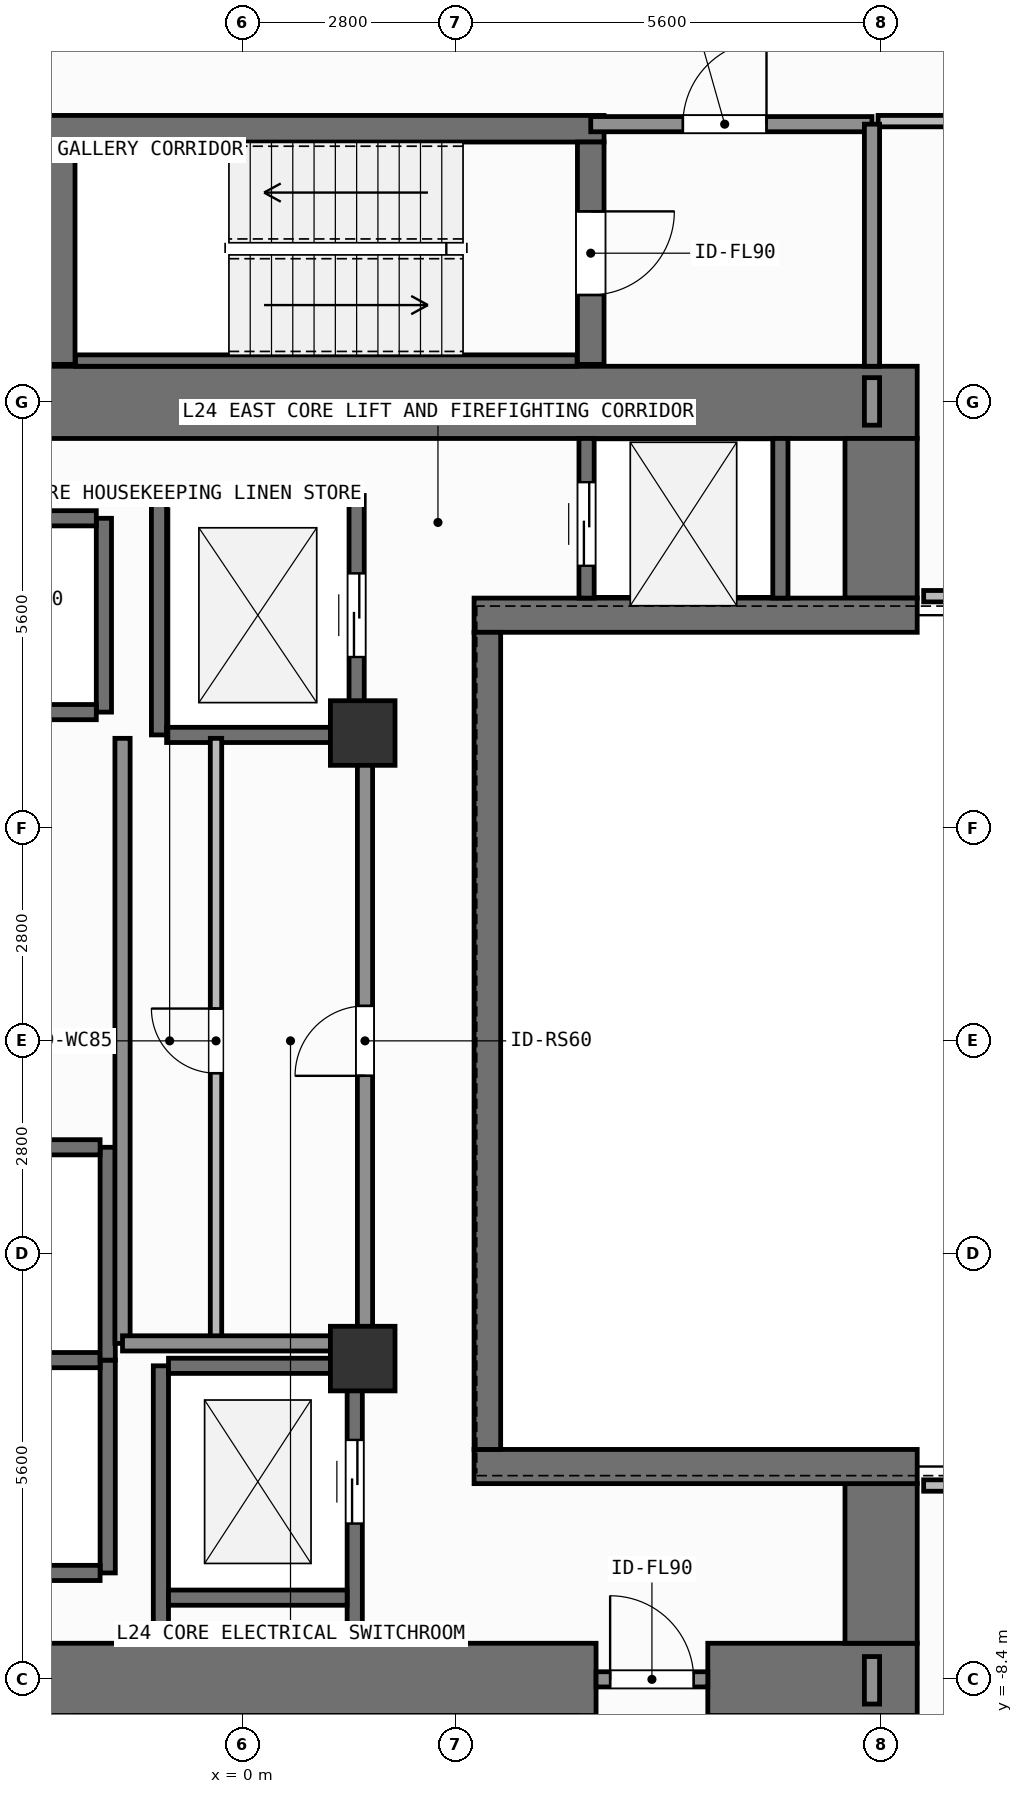
"""IFC4 building model, lengths in metres.
Left out: names, types, materials, properties, quantities, classifications, styles, units other than length and angle.
Written with IfcOpenShell. Run it as: python <this file> out.ifc"""

import sys

from ifc_helpers import new_model, si_unit, direction, frame, frame_2d, origin, origin_2d, place, context, subcontext, project, spatial, rectangle, extrude, element, fill, save


model = new_model("IFC4")
c1 = context("Model", 3, precision=1e-05, world=origin(), true_north=direction((0.0, 1.0)))
c2 = subcontext(c1, "Body", "Model", "MODEL_VIEW")
j1 = project(units=[si_unit("LENGTHUNIT", "METRE"), si_unit("PLANEANGLEUNIT", "RADIAN")], contexts=[c1])
p1 = place(None, origin())
s1 = spatial("IfcSite", under=j1, at=p1, CompositionType="ELEMENT")
p2 = place(p1, origin())
s2 = spatial("IfcBuilding", under=s1, at=p2, CompositionType="ELEMENT")
p3 = place(p2, frame((0.0, 0.0, 96.9)))
s3 = spatial("IfcBuildingStorey", under=s2, at=p3, CompositionType="ELEMENT", Elevation=96.9)
p4 = place(p3, frame((-2.62, -8.4, 0.0), z_axis=(0.0, 0.0, 1.0), x_axis=(1.0, 0.0, 0.0)))
e1 = element("IfcWall", 1, at=p4, inside=s3, PredefinedType="SHEAR", context=c2, shape_type="SweptSolid", body=[
    extrude(rectangle(XDim=7.27, YDim=0.95, at=frame_2d((3.635, 0.0))), origin(), (0.0, 0.0, 1.0), 3.9),
])
p5 = place(p3, frame((6.12, -8.4, 0.0), z_axis=(0.0, 0.0, 1.0), x_axis=(1.0, 0.0, 0.0)))
e2 = element("IfcWall", 2, at=p5, inside=s3, PredefinedType="SHEAR", context=c2, shape_type="SweptSolid", body=[
    extrude(rectangle(XDim=2.755, YDim=0.95, at=frame_2d((1.377, 0.0))), origin(), (0.0, 0.0, 1.0), 3.9),
])
p6 = place(p3, frame((-7.55, 8.4, 0.0), z_axis=(0.0, 0.0, 1.0), x_axis=(1.0, 0.0, 0.0)))
e3 = element("IfcWall", 3, at=p6, inside=s3, PredefinedType="SHEAR", context=c2, shape_type="SweptSolid", body=[
    extrude(rectangle(XDim=16.425, YDim=0.95, at=frame_2d((8.212, 0.0))), origin(), (0.0, 0.0, 1.0), 3.9),
])
for number, where, z_axis, x_axis in (
    (4, (8.4, -7.925, 0.0), (0.0, 0.0, 1.0), (0.0, 1.0, 0.0)),
    (5, (8.4, 5.825, 0.0), (0.0, 0.0, 1.0), (0.0, 1.0, 0.0)),
):
    element("IfcWall", number, at=place(p3, frame(where, z_axis=z_axis, x_axis=x_axis)), inside=s3, PredefinedType="SHEAR", context=c2, shape_type="SweptSolid", body=[
        extrude(rectangle(XDim=2.1, YDim=0.95, at=frame_2d((1.05, 0.0))), origin(), (0.0, 0.0, 1.0), 3.9),
    ])
for number, where, z_axis, x_axis in (
    (6, (3.045, -5.6, 0.0), (0.0, 0.0, 1.0), (1.0, 0.0, 0.0)),
    (7, (3.045, 5.6, 0.0), (0.0, 0.0, 1.0), (1.0, 0.0, 0.0)),
):
    element("IfcWall", number, at=place(p3, frame(where, z_axis=z_axis, x_axis=x_axis)), inside=s3, PredefinedType="SHEAR", context=c2, shape_type="SweptSolid", body=[
        extrude(rectangle(XDim=5.83, YDim=0.45, at=frame_2d((2.915, 0.0))), origin(), (0.0, 0.0, 1.0), 3.9),
    ])
p7 = place(p3, frame((3.22, -5.375, 0.0), z_axis=(0.0, 0.0, 1.0), x_axis=(0.0, 1.0, 0.0)))
e8 = element("IfcWall", 8, at=p7, inside=s3, PredefinedType="SHEAR", context=c2, shape_type="SweptSolid", body=[
    extrude(rectangle(XDim=10.75, YDim=0.35, at=frame_2d((5.375, 0.0))), origin(), (0.0, 0.0, 1.0), 3.9),
])
p8 = place(p3, frame((-2.555, 12.0, 0.0), z_axis=(0.0, 0.0, 1.0), x_axis=(1.0, 0.0, 0.0)))
e9 = element("IfcWall", 9, at=p8, inside=s3, PredefinedType="SHEAR", context=c2, shape_type="SweptSolid", body=[
    extrude(rectangle(XDim=7.31, YDim=0.35, at=frame_2d((3.655, 0.0))), origin(), (0.0, 0.0, 1.0), 3.9),
])
p9 = place(p3, frame((-2.2, 8.95, 0.0), z_axis=(0.0, 0.0, 1.0), x_axis=(1.0, 0.0, 0.0)))
e10 = element("IfcWall", 10, at=p9, inside=s3, PredefinedType="SHEAR", context=c2, shape_type="SweptSolid", body=[
    extrude(rectangle(XDim=6.6, YDim=0.15, at=frame_2d((3.3, 0.0))), origin(), (0.0, 0.0, 1.0), 3.9),
])
p10 = place(p3, frame((-2.38, 8.9, 0.0), z_axis=(0.0, 0.0, 1.0), x_axis=(0.0, 1.0, 0.0)))
e11 = element("IfcWall", 11, at=p10, inside=s3, PredefinedType="SHEAR", context=c2, shape_type="SweptSolid", body=[
    extrude(rectangle(XDim=2.925, YDim=0.35, at=frame_2d((1.462, 0.0))), origin(), (0.0, 0.0, 1.0), 3.9),
])
p11 = place(p3, frame((4.58, 11.825, 0.0), z_axis=(0.0, 0.0, 1.0), x_axis=(0.0, -1.0, 0.0)))
e12 = element("IfcWall", 12, at=p11, inside=s3, PredefinedType="SHEAR", context=c2, shape_type="SweptSolid", body=[
    extrude(rectangle(XDim=2.925, YDim=0.35, at=frame_2d((1.462, 0.0))), origin(), (0.0, 0.0, 1.0), 3.9),
])
p12 = place(p11, frame((0.913, 0.0, 0.0)))
e13 = element("IfcOpeningElement", 13, at=p12, cuts=e12, PredefinedType="OPENING", context=c2, shape_type="SweptSolid", body=[
    extrude(rectangle(XDim=1.1, YDim=2.15, at=frame_2d((0.55, 1.075))), frame((0.0, 0.185, 0.0), z_axis=(0.0, -1.0, 0.0), x_axis=(1.0, 0.0, 0.0)), (0.0, 0.0, 1.0), 0.37),
])
for number, where, z_axis, x_axis in (
    (14, (1.58, -4.18, 0.0), (0.0, 0.0, 1.0), (1.0, 0.0, 0.0)),
    (15, (1.58, 4.05, 0.0), (0.0, 0.0, 1.0), (1.0, 0.0, 0.0)),
):
    element("IfcColumn", number, at=place(p3, frame(where, z_axis=z_axis, x_axis=x_axis)), inside=s3, PredefinedType="COLUMN", context=c2, shape_type="SweptSolid", body=[
        extrude(rectangle(XDim=0.85, YDim=0.85, at=origin_2d()), origin(), (0.0, 0.0, 1.0), 3.9),
    ])
p13 = place(p3, frame((-1.825, 4.325, 0.0), z_axis=(0.0, 0.0, 1.0), x_axis=(0.0, 1.0, 0.0)))
e16 = element("IfcWall", 16, at=p13, inside=s3, PredefinedType="SHEAR", context=c2, shape_type="SweptSolid", body=[
    extrude(rectangle(XDim=2.55, YDim=0.2, at=frame_2d((1.275, 0.0))), origin(), (0.0, 0.0, 1.0), 3.68),
])
for number, where, z_axis, x_axis in (
    (17, (-4.275, 4.325, 0.0), (0.0, 0.0, 1.0), (1.0, 0.0, 0.0)),
    (18, (-4.275, 6.875, 0.0), (0.0, 0.0, 1.0), (1.0, 0.0, 0.0)),
):
    element("IfcWall", number, at=place(p3, frame(where, z_axis=z_axis, x_axis=x_axis)), inside=s3, PredefinedType="SHEAR", context=c2, shape_type="SweptSolid", body=[
        extrude(rectangle(XDim=2.35, YDim=0.2, at=frame_2d((1.175, 0.0))), origin(), (0.0, 0.0, 1.0), 3.68),
    ])
p14 = place(p3, frame((-1.775, -7.0, 0.0), z_axis=(0.0, 0.0, 1.0), x_axis=(0.0, 1.0, 0.0)))
e19 = element("IfcWall", 19, at=p14, inside=s3, PredefinedType="SHEAR", context=c2, shape_type="SweptSolid", body=[
    extrude(rectangle(XDim=2.8, YDim=0.2, at=frame_2d((1.4, 0.0))), origin(), (0.0, 0.0, 1.0), 3.68),
])
for number, where, z_axis, x_axis in (
    (20, (-4.325, -7.0, 0.0), (0.0, 0.0, 1.0), (1.0, 0.0, 0.0)),
    (21, (-4.325, -4.2, 0.0), (0.0, 0.0, 1.0), (1.0, 0.0, 0.0)),
):
    element("IfcWall", number, at=place(p3, frame(where, z_axis=z_axis, x_axis=x_axis)), inside=s3, PredefinedType="SHEAR", context=c2, shape_type="SweptSolid", body=[
        extrude(rectangle(XDim=2.45, YDim=0.2, at=frame_2d((1.225, 0.0))), origin(), (0.0, 0.0, 1.0), 3.68),
    ])
p15 = place(p3, frame((-1.775, -4.2, 0.0), z_axis=(0.0, 0.0, 1.0), x_axis=(0.0, 1.0, 0.0)))
e22 = element("IfcWall", 22, at=p15, inside=s3, PredefinedType="SHEAR", context=c2, shape_type="SweptSolid", body=[
    extrude(rectangle(XDim=2.8, YDim=0.2, at=frame_2d((1.4, 0.0))), origin(), (0.0, 0.0, 1.0), 3.68),
])
p16 = place(p3, frame((-4.325, -1.4, 0.0), z_axis=(0.0, 0.0, 1.0), x_axis=(1.0, 0.0, 0.0)))
e23 = element("IfcWall", 23, at=p16, inside=s3, PredefinedType="SHEAR", context=c2, shape_type="SweptSolid", body=[
    extrude(rectangle(XDim=2.45, YDim=0.2, at=frame_2d((1.225, 0.0))), origin(), (0.0, 0.0, 1.0), 3.68),
])
p17 = place(p3, frame((-1.1, 4.025, 0.0), z_axis=(0.0, 0.0, 1.0), x_axis=(0.0, 1.0, 0.0)))
e24 = element("IfcWall", 24, at=p17, inside=s3, PredefinedType="SHEAR", context=c2, shape_type="SweptSolid", body=[
    extrude(rectangle(XDim=3.15, YDim=0.2, at=frame_2d((1.575, 0.0))), origin(), (0.0, 0.0, 1.0), 3.68),
])
p18 = place(p3, frame((1.5, 4.025, 0.0), z_axis=(0.0, 0.0, 1.0), x_axis=(0.0, 1.0, 0.0)))
e25 = element("IfcWall", 25, at=p18, inside=s3, PredefinedType="SHEAR", context=c2, shape_type="SweptSolid", body=[
    extrude(rectangle(XDim=3.15, YDim=0.2, at=frame_2d((1.575, 0.0))), origin(), (0.0, 0.0, 1.0), 3.68),
])
p19 = place(p18, frame((1.025, 0.0, 0.0)))
e26 = element("IfcOpeningElement", 26, at=p19, cuts=e25, PredefinedType="OPENING", context=c2, shape_type="SweptSolid", body=[
    extrude(rectangle(XDim=1.1, YDim=2.2, at=frame_2d((0.55, 1.1))), frame((0.0, 0.11, 0.0), z_axis=(0.0, -1.0, 0.0), x_axis=(1.0, 0.0, 0.0)), (0.0, 0.0, 1.0), 0.22),
])
for number, where, z_axis, x_axis in (
    (27, (-1.0, 4.025, 0.0), (0.0, 0.0, 1.0), (1.0, 0.0, 0.0)),
    (28, (-1.0, 7.175, 0.0), (0.0, 0.0, 1.0), (1.0, 0.0, 0.0)),
):
    element("IfcWall", number, at=place(p3, frame(where, z_axis=z_axis, x_axis=x_axis)), inside=s3, PredefinedType="SHEAR", context=c2, shape_type="SweptSolid", body=[
        extrude(rectangle(XDim=2.4, YDim=0.2, at=frame_2d((1.2, 0.0))), origin(), (0.0, 0.0, 1.0), 3.68),
    ])
p20 = place(p3, frame((-1.075, -7.925, 0.0), z_axis=(0.0, 0.0, 1.0), x_axis=(0.0, 1.0, 0.0)))
e29 = element("IfcWall", 29, at=p20, inside=s3, PredefinedType="SHEAR", context=c2, shape_type="SweptSolid", body=[
    extrude(rectangle(XDim=3.65, YDim=0.2, at=frame_2d((1.825, 0.0))), origin(), (0.0, 0.0, 1.0), 3.68),
])
p21 = place(p3, frame((1.475, -7.925, 0.0), z_axis=(0.0, 0.0, 1.0), x_axis=(0.0, 1.0, 0.0)))
e30 = element("IfcWall", 30, at=p21, inside=s3, PredefinedType="SHEAR", context=c2, shape_type="SweptSolid", body=[
    extrude(rectangle(XDim=3.65, YDim=0.2, at=frame_2d((1.825, 0.0))), origin(), (0.0, 0.0, 1.0), 3.68),
])
p22 = place(p21, frame((1.575, 0.0, 0.0)))
e31 = element("IfcOpeningElement", 31, at=p22, cuts=e30, PredefinedType="OPENING", context=c2, shape_type="SweptSolid", body=[
    extrude(rectangle(XDim=1.1, YDim=2.2, at=frame_2d((0.55, 1.1))), frame((0.0, 0.11, 0.0), z_axis=(0.0, -1.0, 0.0), x_axis=(1.0, 0.0, 0.0)), (0.0, 0.0, 1.0), 0.22),
])
for number, where, z_axis, x_axis in (
    (32, (-0.975, -7.325, 0.0), (0.0, 0.0, 1.0), (1.0, 0.0, 0.0)),
    (33, (-0.975, -4.275, 0.0), (0.0, 0.0, 1.0), (1.0, 0.0, 0.0)),
):
    element("IfcWall", number, at=place(p3, frame(where, z_axis=z_axis, x_axis=x_axis)), inside=s3, PredefinedType="SHEAR", context=c2, shape_type="SweptSolid", body=[
        extrude(rectangle(XDim=2.35, YDim=0.2, at=frame_2d((1.175, 0.0))), origin(), (0.0, 0.0, 1.0), 3.68),
    ])
p23 = place(p3, frame((4.525, 5.825, 0.0), z_axis=(0.0, 0.0, 1.0), x_axis=(0.0, 1.0, 0.0)))
e34 = element("IfcWall", 34, at=p23, inside=s3, PredefinedType="SHEAR", context=c2, shape_type="SweptSolid", body=[
    extrude(rectangle(XDim=2.1, YDim=0.2, at=frame_2d((1.05, 0.0))), origin(), (0.0, 0.0, 1.0), 3.68),
])
p24 = place(p23, frame((0.425, 0.0, 0.0)))
e35 = element("IfcOpeningElement", 35, at=p24, cuts=e34, PredefinedType="OPENING", context=c2, shape_type="SweptSolid", body=[
    extrude(rectangle(XDim=1.1, YDim=2.2, at=frame_2d((0.55, 1.1))), frame((0.0, 0.11, 0.0), z_axis=(0.0, -1.0, 0.0), x_axis=(1.0, 0.0, 0.0)), (0.0, 0.0, 1.0), 0.22),
])
p25 = place(p3, frame((7.075, 5.825, 0.0), z_axis=(0.0, 0.0, 1.0), x_axis=(0.0, 1.0, 0.0)))
e36 = element("IfcWall", 36, at=p25, inside=s3, PredefinedType="SHEAR", context=c2, shape_type="SweptSolid", body=[
    extrude(rectangle(XDim=2.1, YDim=0.2, at=frame_2d((1.05, 0.0))), origin(), (0.0, 0.0, 1.0), 3.68),
])
p26 = place(p3, frame((4.65, -8.4, 0.0), z_axis=(0.0, 0.0, 1.0), x_axis=(1.0, 0.0, 0.0)))
e37 = element("IfcWall", 37, at=p26, inside=s3, PredefinedType="SOLIDWALL", context=c2, shape_type="SweptSolid", body=[
    extrude(rectangle(XDim=1.47, YDim=0.2, at=frame_2d((0.735, 0.0))), origin(), (0.0, 0.0, 1.0), 2.72),
])
p27 = place(p26, frame((0.185, 0.0, 0.0)))
e38 = element("IfcOpeningElement", 38, at=p27, cuts=e37, PredefinedType="OPENING", context=c2, shape_type="SweptSolid", body=[
    extrude(rectangle(XDim=1.1, YDim=2.15, at=frame_2d((0.55, 1.075))), frame((0.0, 0.11, 0.0), z_axis=(0.0, -1.0, 0.0), x_axis=(1.0, 0.0, 0.0)), (0.0, 0.0, 1.0), 0.22),
])
p28 = place(p3, frame((4.58, 12.06, 0.0), z_axis=(0.0, 0.0, 1.0), x_axis=(1.0, 0.0, 0.0)))
e39 = element("IfcWall", 39, at=p28, inside=s3, PredefinedType="SOLIDWALL", context=c2, shape_type="SweptSolid", body=[
    extrude(rectangle(XDim=3.7, YDim=0.2, at=frame_2d((1.85, 0.0))), origin(), (0.0, 0.0, 1.0), 3.68),
])
p29 = place(p28, frame((1.212, 0.0, 0.0)))
e40 = element("IfcOpeningElement", 40, at=p29, cuts=e39, PredefinedType="OPENING", context=c2, shape_type="SweptSolid", body=[
    extrude(rectangle(XDim=1.1, YDim=2.15, at=frame_2d((0.55, 1.075))), frame((0.0, 0.11, 0.0), z_axis=(0.0, -1.0, 0.0), x_axis=(1.0, 0.0, 0.0)), (0.0, 0.0, 1.0), 0.22),
])
p30 = place(p3, frame((-0.35, -3.98, 0.0), z_axis=(0.0, 0.0, 1.0), x_axis=(0.0, 1.0, 0.0)))
e41 = element("IfcWall", 41, at=p30, inside=s3, PredefinedType="PARTITIONING", context=c2, shape_type="SweptSolid", body=[
    extrude(rectangle(XDim=7.96, YDim=0.15, at=frame_2d((3.98, 0.0))), origin(), (0.0, 0.0, 1.0), 3.68),
])
p31 = place(p30, frame((3.555, 0.0, 0.0)))
e42 = element("IfcOpeningElement", 42, at=p31, cuts=e41, PredefinedType="OPENING", context=c2, shape_type="SweptSolid", body=[
    extrude(rectangle(XDim=0.85, YDim=2.1, at=frame_2d((0.425, 1.05))), frame((0.0, 0.085, 0.0), z_axis=(0.0, -1.0, 0.0), x_axis=(1.0, 0.0, 0.0)), (0.0, 0.0, 1.0), 0.17),
])
p32 = place(p3, frame((1.61, -3.98, 0.0), z_axis=(0.0, 0.0, 1.0), x_axis=(0.0, 1.0, 0.0)))
e43 = element("IfcWall", 43, at=p32, inside=s3, PredefinedType="SOLIDWALL", context=c2, shape_type="SweptSolid", body=[
    extrude(rectangle(XDim=7.96, YDim=0.2, at=frame_2d((3.98, 0.0))), origin(), (0.0, 0.0, 1.0), 3.68),
])
p33 = place(p32, frame((3.52, 0.0, 0.0)))
e44 = element("IfcOpeningElement", 44, at=p33, cuts=e43, PredefinedType="OPENING", context=c2, shape_type="SweptSolid", body=[
    extrude(rectangle(XDim=0.92, YDim=2.1, at=frame_2d((0.46, 1.05))), frame((0.0, 0.11, 0.0), z_axis=(0.0, -1.0, 0.0), x_axis=(1.0, 0.0, 0.0)), (0.0, 0.0, 1.0), 0.22),
])
p34 = place(p3, frame((8.36, 12.1, 0.0), z_axis=(0.0, 0.0, 1.0), x_axis=(1.0, 0.0, 0.0)))
e45 = element("IfcWall", 45, at=p34, inside=s3, PredefinedType="PARTITIONING", context=c2, shape_type="SweptSolid", body=[
    extrude(rectangle(XDim=7.22, YDim=0.15, at=frame_2d((3.61, 0.0))), origin(), (0.0, 0.0, 1.0), 3.68),
])
p35 = place(p34, frame((3.513, 0.0, 0.0)))
e46 = element("IfcOpeningElement", 46, at=p35, cuts=e45, PredefinedType="OPENING", context=c2, shape_type="SweptSolid", body=[
    extrude(rectangle(XDim=0.9, YDim=2.1, at=frame_2d((0.45, 1.05))), frame((0.0, 0.085, 0.0), z_axis=(0.0, -1.0, 0.0), x_axis=(1.0, 0.0, 0.0)), (0.0, 0.0, 1.0), 0.17),
])
p36 = place(p3, frame((8.28, 8.875, 0.0), z_axis=(0.0, 0.0, 1.0), x_axis=(0.0, 1.0, 0.0)))
e47 = element("IfcWall", 47, at=p36, inside=s3, PredefinedType="SOLIDWALL", context=c2, shape_type="SweptSolid", body=[
    extrude(rectangle(XDim=3.185, YDim=0.2, at=frame_2d((1.593, 0.0))), origin(), (0.0, 0.0, 1.0), 3.68),
])
p37 = place(p3, frame((-1.58, -3.98, 0.0), z_axis=(0.0, 0.0, 1.0), x_axis=(0.0, 1.0, 0.0)))
e48 = element("IfcWall", 48, at=p37, inside=s3, PredefinedType="SOLIDWALL", context=c2, shape_type="SweptSolid", body=[
    extrude(rectangle(XDim=7.96, YDim=0.2, at=frame_2d((3.98, 0.0))), origin(), (0.0, 0.0, 1.0), 3.68),
])
p38 = place(p3, frame((-1.58, -3.98, 0.0), z_axis=(0.0, 0.0, 1.0), x_axis=(1.0, 0.0, 0.0)))
e49 = element("IfcWall", 49, at=p38, inside=s3, PredefinedType="SOLIDWALL", context=c2, shape_type="SweptSolid", body=[
    extrude(rectangle(XDim=3.19, YDim=0.2, at=frame_2d((1.595, 0.0))), origin(), (0.0, 0.0, 1.0), 3.68),
])
p39 = place(p3, frame((8.28, -8.725, 0.0), z_axis=(0.0, 0.0, 1.0), x_axis=(0.0, 1.0, 0.0)))
e50 = element("IfcWall", 50, at=p39, inside=s3, PredefinedType="SOLIDWALL", context=c2, shape_type="SweptSolid", body=[
    extrude(rectangle(XDim=0.625, YDim=0.2, at=frame_2d((0.312, 0.0))), origin(), (0.0, 0.0, 1.0), 3.68),
])
p40 = place(p3, frame((8.96, -5.85, 0.0), z_axis=(0.0, 0.0, 1.0), x_axis=(1.0, 0.0, 0.0)))
e51 = element("IfcWall", 51, at=p40, inside=s3, PredefinedType="PARTITIONING", context=c2, shape_type="SweptSolid", body=[
    extrude(rectangle(XDim=6.62, YDim=0.15, at=frame_2d((3.31, 0.0))), origin(), (0.0, 0.0, 1.0), 3.68),
])
p41 = place(p3, frame((8.28, 8.1, 0.0), z_axis=(0.0, 0.0, 1.0), x_axis=(0.0, 1.0, 0.0)))
e52 = element("IfcWall", 52, at=p41, inside=s3, PredefinedType="SOLIDWALL", context=c2, shape_type="SweptSolid", body=[
    extrude(rectangle(XDim=0.625, YDim=0.2, at=frame_2d((0.312, 0.0))), origin(), (0.0, 0.0, 1.0), 3.68),
])
p42 = place(p3, frame((8.96, 5.85, 0.0), z_axis=(0.0, 0.0, 1.0), x_axis=(1.0, 0.0, 0.0)))
e53 = element("IfcWall", 53, at=p42, inside=s3, PredefinedType="PARTITIONING", context=c2, shape_type="SweptSolid", body=[
    extrude(rectangle(XDim=6.62, YDim=0.15, at=frame_2d((3.31, 0.0))), origin(), (0.0, 0.0, 1.0), 3.68),
])
p43 = place(p19, origin())
e54 = element("IfcDoor", 54, at=p43, inside=s3, OperationType="SLIDING_TO_LEFT", PredefinedType="DOOR", context=c2, shape_type="SweptSolid", body=[
    extrude(rectangle(XDim=1.1, YDim=2.2, at=frame_2d((0.55, 1.1))), frame((0.0, 0.025, 0.0), z_axis=(0.0, -1.0, 0.0), x_axis=(1.0, 0.0, 0.0)), (0.0, 0.0, 1.0), 0.05),
])
fill(e26, e54)
p44 = place(p22, origin())
e55 = element("IfcDoor", 55, at=p44, inside=s3, OperationType="SLIDING_TO_LEFT", PredefinedType="DOOR", context=c2, shape_type="SweptSolid", body=[
    extrude(rectangle(XDim=1.1, YDim=2.2, at=frame_2d((0.55, 1.1))), frame((0.0, 0.025, 0.0), z_axis=(0.0, -1.0, 0.0), x_axis=(1.0, 0.0, 0.0)), (0.0, 0.0, 1.0), 0.05),
])
fill(e31, e55)
p45 = place(p24, origin())
e56 = element("IfcDoor", 56, at=p45, inside=s3, OperationType="SLIDING_TO_LEFT", PredefinedType="DOOR", context=c2, shape_type="SweptSolid", body=[
    extrude(rectangle(XDim=1.1, YDim=2.2, at=frame_2d((0.55, 1.1))), frame((0.0, 0.025, 0.0), z_axis=(0.0, -1.0, 0.0), x_axis=(1.0, 0.0, 0.0)), (0.0, 0.0, 1.0), 0.05),
])
fill(e35, e56)
p46 = place(p12, origin())
e57 = element("IfcDoor", 57, at=p46, inside=s3, OperationType="SINGLE_SWING_LEFT", PredefinedType="DOOR", context=c2, shape_type="SweptSolid", body=[
    extrude(rectangle(XDim=1.1, YDim=2.15, at=frame_2d((0.55, 1.075))), frame((0.0, 0.025, 0.0), z_axis=(0.0, -1.0, 0.0), x_axis=(1.0, 0.0, 0.0)), (0.0, 0.0, 1.0), 0.05),
])
fill(e13, e57)
p47 = place(p27, origin())
e58 = element("IfcDoor", 58, at=p47, inside=s3, OperationType="SINGLE_SWING_LEFT", PredefinedType="DOOR", context=c2, shape_type="SweptSolid", body=[
    extrude(rectangle(XDim=1.1, YDim=2.15, at=frame_2d((0.55, 1.075))), frame((0.0, 0.025, 0.0), z_axis=(0.0, -1.0, 0.0), x_axis=(1.0, 0.0, 0.0)), (0.0, 0.0, 1.0), 0.05),
])
fill(e38, e58)
p48 = place(p29, origin())
e59 = element("IfcDoor", 59, at=p48, inside=s3, OperationType="SINGLE_SWING_RIGHT", PredefinedType="DOOR", context=c2, shape_type="SweptSolid", body=[
    extrude(rectangle(XDim=1.1, YDim=2.15, at=frame_2d((0.55, 1.075))), frame((0.0, 0.025, 0.0), z_axis=(0.0, -1.0, 0.0), x_axis=(1.0, 0.0, 0.0)), (0.0, 0.0, 1.0), 0.05),
])
fill(e40, e59)
p49 = place(p31, origin())
e60 = element("IfcDoor", 60, at=p49, inside=s3, OperationType="SINGLE_SWING_RIGHT", PredefinedType="DOOR", context=c2, shape_type="SweptSolid", body=[
    extrude(rectangle(XDim=0.85, YDim=2.1, at=frame_2d((0.425, 1.05))), frame((0.0, 0.025, 0.0), z_axis=(0.0, -1.0, 0.0), x_axis=(1.0, 0.0, 0.0)), (0.0, 0.0, 1.0), 0.05),
])
fill(e42, e60)
p50 = place(p33, origin())
e61 = element("IfcDoor", 61, at=p50, inside=s3, OperationType="SINGLE_SWING_LEFT", PredefinedType="DOOR", context=c2, shape_type="SweptSolid", body=[
    extrude(rectangle(XDim=0.92, YDim=2.1, at=frame_2d((0.46, 1.05))), frame((0.0, 0.025, 0.0), z_axis=(0.0, -1.0, 0.0), x_axis=(1.0, 0.0, 0.0)), (0.0, 0.0, 1.0), 0.05),
])
fill(e44, e61)
save(model, sys.argv[1])
